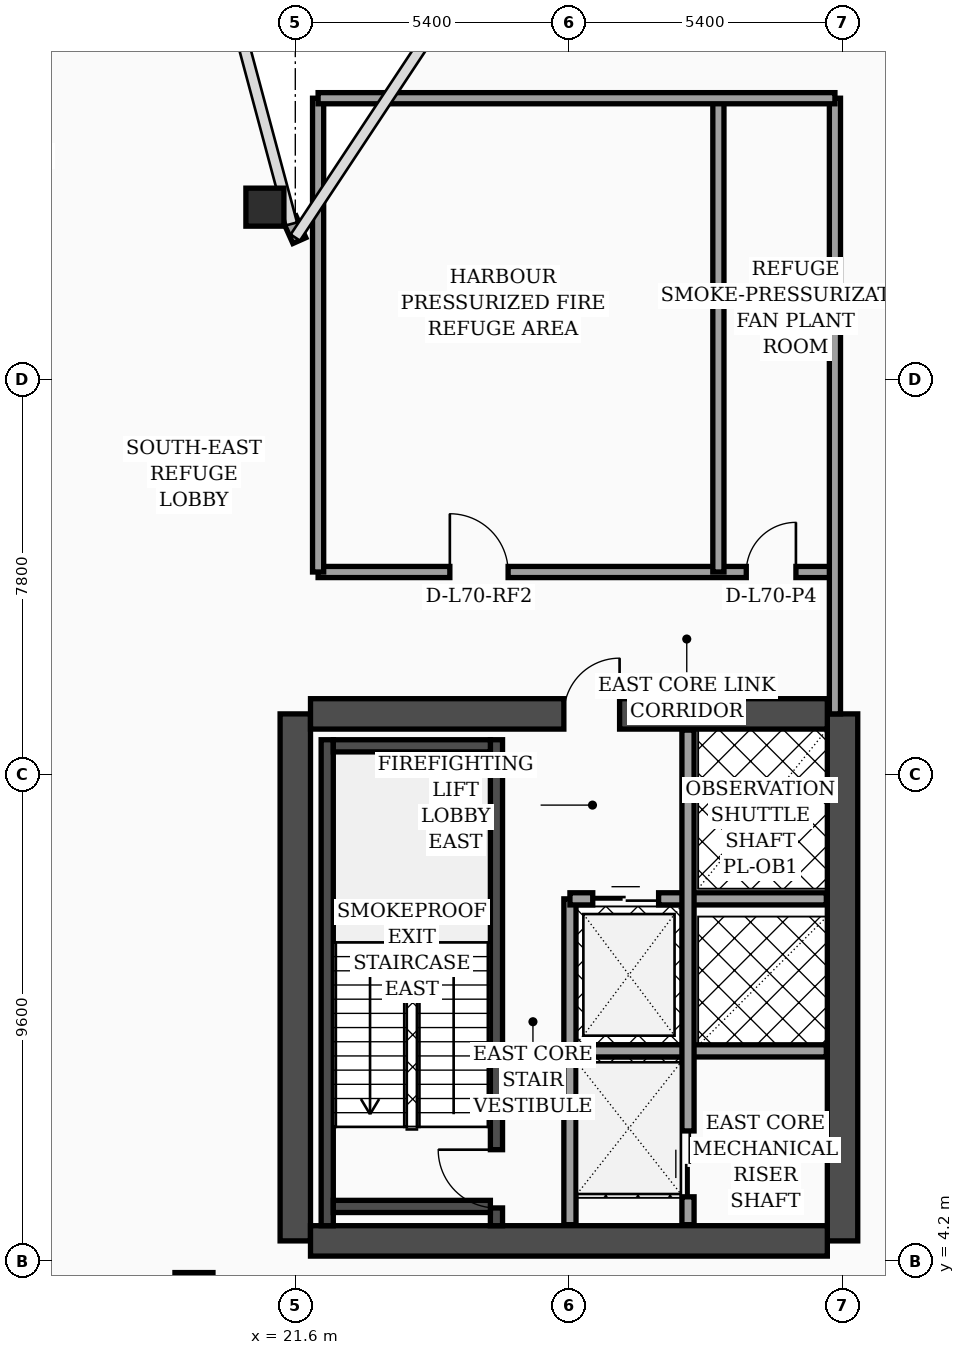
"""IFC4 building model, lengths in metres.
Left out: names, types, materials, properties, quantities, classifications, styles, units other than length and angle.
Written with IfcOpenShell. Run it as: python <this file> out.ifc"""

import sys

from ifc_helpers import new_model, si_unit, direction, frame, frame_2d, origin, origin_2d, place, context, subcontext, project, spatial, rectangle, hollow_rectangle, extrude, element, fill, save


model = new_model("IFC4")
c1 = context("Model", 3, precision=1e-05, world=origin(), true_north=direction((0.0, 1.0)))
c2 = subcontext(c1, "Body", "Model", "MODEL_VIEW")
j1 = project(units=[si_unit("LENGTHUNIT", "METRE"), si_unit("PLANEANGLEUNIT", "RADIAN")], contexts=[c1])
p1 = place(None, origin())
s1 = spatial("IfcSite", under=j1, at=p1, CompositionType="ELEMENT")
p2 = place(p1, origin())
s2 = spatial("IfcBuilding", under=s1, at=p2, CompositionType="ELEMENT")
p3 = place(p2, frame((0.0, 0.0, 282.5)))
s3 = spatial("IfcBuildingStorey", under=s2, at=p3, CompositionType="ELEMENT", Elevation=282.5)
for number, where, z_axis, x_axis in (
    (1, (21.6, 4.6, 0.0), (0.0, 0.0, 1.0), (0.0, 1.0, 0.0)),
    (2, (32.4, 4.6, 0.0), (0.0, 0.0, 1.0), (0.0, 1.0, 0.0)),
):
    element("IfcWall", number, at=place(p3, frame(where, z_axis=z_axis, x_axis=x_axis)), inside=s3, PredefinedType="SHEAR", context=c2, shape_type="SweptSolid", body=[
        extrude(rectangle(XDim=10.4, YDim=0.6, at=frame_2d((5.2, 0.0))), origin(), (0.0, 0.0, 1.0), 4.35),
    ])
p4 = place(p3, frame((21.9, 15.0, 0.0), z_axis=(0.0, 0.0, 1.0), x_axis=(1.0, 0.0, 0.0)))
e3 = element("IfcWall", 3, at=p4, inside=s3, PredefinedType="SHEAR", context=c2, shape_type="SweptSolid", body=[
    extrude(rectangle(XDim=10.2, YDim=0.6, at=frame_2d((5.1, 0.0))), origin(), (0.0, 0.0, 1.0), 4.35),
])
p5 = place(p4, frame((5.0, 0.0, 0.0)))
e4 = element("IfcOpeningElement", 4, at=p5, cuts=e3, PredefinedType="OPENING", context=c2, shape_type="SweptSolid", body=[
    extrude(rectangle(XDim=1.1, YDim=2.2, at=frame_2d((0.55, 1.1))), frame((0.0, 0.31, 0.0), z_axis=(0.0, -1.0, 0.0), x_axis=(1.0, 0.0, 0.0)), (0.0, 0.0, 1.0), 0.62),
])
p6 = place(p3, frame((21.9, 4.6, 0.0), z_axis=(0.0, 0.0, 1.0), x_axis=(1.0, 0.0, 0.0)))
e5 = element("IfcWall", 5, at=p6, inside=s3, PredefinedType="SHEAR", context=c2, shape_type="SweptSolid", body=[
    extrude(rectangle(XDim=10.2, YDim=0.6, at=frame_2d((5.1, 0.0))), origin(), (0.0, 0.0, 1.0), 4.35),
])
p7 = place(p3, frame((22.23, 4.9, 0.0), z_axis=(0.0, 0.0, 1.0), x_axis=(0.0, 1.0, 0.0)))
e6 = element("IfcWall", 6, at=p7, inside=s3, PredefinedType="SOLIDWALL", context=c2, shape_type="SweptSolid", body=[
    extrude(rectangle(XDim=9.59, YDim=0.24, at=frame_2d((4.795, 0.0))), origin(), (0.0, 0.0, 1.0), 4.35),
])
p8 = place(p3, frame((25.57, 4.9, 0.0), z_axis=(0.0, 0.0, 1.0), x_axis=(0.0, 1.0, 0.0)))
e7 = element("IfcWall", 7, at=p8, inside=s3, PredefinedType="SOLIDWALL", context=c2, shape_type="SweptSolid", body=[
    extrude(rectangle(XDim=9.59, YDim=0.24, at=frame_2d((4.795, 0.0))), origin(), (0.0, 0.0, 1.0), 4.35),
])
p9 = place(p8, frame((0.35, 0.0, 0.0)))
e8 = element("IfcOpeningElement", 8, at=p9, cuts=e7, PredefinedType="OPENING", context=c2, shape_type="SweptSolid", body=[
    extrude(rectangle(XDim=1.15, YDim=2.2, at=frame_2d((0.575, 1.1))), frame((0.0, 0.13, 0.0), z_axis=(0.0, -1.0, 0.0), x_axis=(1.0, 0.0, 0.0)), (0.0, 0.0, 1.0), 0.26),
])
for number, where, z_axis, x_axis in (
    (9, (22.35, 5.28, 0.0), (0.0, 0.0, 1.0), (1.0, 0.0, 0.0)),
    (10, (22.35, 14.37, 0.0), (0.0, 0.0, 1.0), (1.0, 0.0, 0.0)),
):
    element("IfcWall", number, at=place(p3, frame(where, z_axis=z_axis, x_axis=x_axis)), inside=s3, PredefinedType="SOLIDWALL", context=c2, shape_type="SweptSolid", body=[
        extrude(rectangle(XDim=3.1, YDim=0.24, at=frame_2d((1.55, 0.0))), origin(), (0.0, 0.0, 1.0), 4.35),
    ])
for number, where, z_axis, x_axis in (
    (11, (21.0, 25.0, 0.0), (0.0, 0.0, 1.0), (1.0, 0.0, 0.0)),
    (12, (19.6, 3.6, 0.0), (0.0, 0.0, 1.0), (1.0, 0.0, 0.0)),
):
    element("IfcColumn", number, at=place(p3, frame(where, z_axis=z_axis, x_axis=x_axis)), inside=s3, PredefinedType="COLUMN", context=c2, shape_type="SweptSolid", body=[
        extrude(hollow_rectangle(XDim=0.75, YDim=0.75, WallThickness=0.032, at=origin_2d()), origin(), (0.0, 0.0, 1.0), 4.35),
    ])
p10 = place(p3, frame((21.68, 24.34, 0.0), z_axis=(0.0, 0.0, 1.0), x_axis=(-0.40758134973, 0.913168901875, 0.0)))
e13 = element("IfcWall", 13, at=p10, inside=s3, PredefinedType="SOLIDWALL", context=c2, shape_type="SweptSolid", body=[
    extrude(rectangle(XDim=0.471, YDim=0.28, at=frame_2d((0.235, 0.0))), origin(), (0.0, 0.0, 1.0), 4.35),
])
p11 = place(p3, frame((27.02, 4.92, 0.0), z_axis=(0.0, 0.0, 1.0), x_axis=(0.0, 1.0, 0.0)))
e14 = element("IfcWall", 14, at=p11, inside=s3, PredefinedType="SOLIDWALL", context=c2, shape_type="SweptSolid", body=[
    extrude(rectangle(XDim=6.43, YDim=0.24, at=frame_2d((3.215, 0.0))), origin(), (0.0, 0.0, 1.0), 4.35),
])
p12 = place(p3, frame((27.02, 11.35, 0.0), z_axis=(0.0, 0.0, 1.0), x_axis=(1.0, 0.0, 0.0)))
e15 = element("IfcWall", 15, at=p12, inside=s3, PredefinedType="SOLIDWALL", context=c2, shape_type="SweptSolid", body=[
    extrude(rectangle(XDim=5.06, YDim=0.24, at=frame_2d((2.53, 0.0))), origin(), (0.0, 0.0, 1.0), 4.35),
])
p13 = place(p12, frame((0.45, 0.0, 0.0)))
e16 = element("IfcOpeningElement", 16, at=p13, cuts=e15, PredefinedType="OPENING", context=c2, shape_type="SweptSolid", body=[
    extrude(rectangle(XDim=1.3, YDim=2.35, at=frame_2d((0.65, 1.175))), frame((0.0, 0.13, 0.0), z_axis=(0.0, -1.0, 0.0), x_axis=(1.0, 0.0, 0.0)), (0.0, 0.0, 1.0), 0.26),
])
p14 = place(p3, frame((27.02, 8.35, 0.0), z_axis=(0.0, 0.0, 1.0), x_axis=(1.0, 0.0, 0.0)))
e17 = element("IfcWall", 17, at=p14, inside=s3, PredefinedType="SOLIDWALL", context=c2, shape_type="SweptSolid", body=[
    extrude(rectangle(XDim=5.06, YDim=0.24, at=frame_2d((2.53, 0.0))), origin(), (0.0, 0.0, 1.0), 4.35),
])
p15 = place(p3, frame((29.35, 4.92, 0.0), z_axis=(0.0, 0.0, 1.0), x_axis=(0.0, 1.0, 0.0)))
e18 = element("IfcWall", 18, at=p15, inside=s3, PredefinedType="SOLIDWALL", context=c2, shape_type="SweptSolid", body=[
    extrude(rectangle(XDim=9.76, YDim=0.24, at=frame_2d((4.88, 0.0))), origin(), (0.0, 0.0, 1.0), 4.35),
])
p16 = place(p15, frame((0.55, 0.0, 0.0)))
e19 = element("IfcOpeningElement", 19, at=p16, cuts=e18, PredefinedType="OPENING", context=c2, shape_type="SweptSolid", body=[
    extrude(rectangle(XDim=1.3, YDim=2.35, at=frame_2d((0.65, 1.175))), frame((0.0, 0.13, 0.0), z_axis=(0.0, -1.0, 0.0), x_axis=(1.0, 0.0, 0.0)), (0.0, 0.0, 1.0), 0.26),
])
p17 = place(p3, frame((22.05, 17.8, 0.0), z_axis=(0.0, 0.0, 1.0), x_axis=(1.0, 0.0, 0.0)))
e20 = element("IfcWall", 20, at=p17, inside=s3, PredefinedType="SOLIDWALL", context=c2, shape_type="SweptSolid", body=[
    extrude(rectangle(XDim=10.2, YDim=0.22, at=frame_2d((5.1, 0.0))), origin(), (0.0, 0.0, 1.0), 2.65),
])
p18 = place(p17, frame((2.6, 0.0, 0.0)))
e21 = element("IfcOpeningElement", 21, at=p18, cuts=e20, PredefinedType="OPENING", context=c2, shape_type="SweptSolid", body=[
    extrude(rectangle(XDim=1.15, YDim=2.2, at=frame_2d((0.575, 1.1))), frame((0.0, 0.12, 0.0), z_axis=(0.0, -1.0, 0.0), x_axis=(1.0, 0.0, 0.0)), (0.0, 0.0, 1.0), 0.24),
])
p19 = place(p17, frame((8.45, 0.0, 0.0)))
e22 = element("IfcOpeningElement", 22, at=p19, cuts=e20, PredefinedType="OPENING", context=c2, shape_type="SweptSolid", body=[
    extrude(rectangle(XDim=0.98, YDim=2.15, at=frame_2d((0.49, 1.075))), frame((0.0, 0.12, 0.0), z_axis=(0.0, -1.0, 0.0), x_axis=(1.0, 0.0, 0.0)), (0.0, 0.0, 1.0), 0.24),
])
p20 = place(p3, frame((29.95, 17.8, 0.0), z_axis=(0.0, 0.0, 1.0), x_axis=(0.0, 1.0, 0.0)))
e23 = element("IfcWall", 23, at=p20, inside=s3, PredefinedType="SOLIDWALL", context=c2, shape_type="SweptSolid", body=[
    extrude(rectangle(XDim=9.35, YDim=0.22, at=frame_2d((4.675, 0.0))), origin(), (0.0, 0.0, 1.0), 4.0),
])
p21 = place(p3, frame((22.05, 17.8, 0.0), z_axis=(0.0, 0.0, 1.0), x_axis=(0.0, 1.0, 0.0)))
e24 = element("IfcWall", 24, at=p21, inside=s3, PredefinedType="SOLIDWALL", context=c2, shape_type="SweptSolid", body=[
    extrude(rectangle(XDim=9.35, YDim=0.22, at=frame_2d((4.675, 0.0))), origin(), (0.0, 0.0, 1.0), 2.65),
])
p22 = place(p3, frame((32.25, 15.0, 0.0), z_axis=(0.0, 0.0, 1.0), x_axis=(0.0, 1.0, 0.0)))
e25 = element("IfcWall", 25, at=p22, inside=s3, PredefinedType="SOLIDWALL", context=c2, shape_type="SweptSolid", body=[
    extrude(rectangle(XDim=12.15, YDim=0.22, at=frame_2d((6.075, 0.0))), origin(), (0.0, 0.0, 1.0), 2.65),
])
p23 = place(p3, frame((22.05, 27.15, 0.0), z_axis=(0.0, 0.0, 1.0), x_axis=(1.0, 0.0, 0.0)))
e26 = element("IfcWall", 26, at=p23, inside=s3, PredefinedType="SOLIDWALL", context=c2, shape_type="SweptSolid", body=[
    extrude(rectangle(XDim=10.2, YDim=0.22, at=frame_2d((5.1, 0.0))), origin(), (0.0, 0.0, 1.0), 2.65),
])
p24 = place(p13, origin())
e27 = element("IfcDoor", 27, at=p24, inside=s3, OperationType="DOUBLE_DOOR_SLIDING", PredefinedType="DOOR", context=c2, shape_type="SweptSolid", body=[
    extrude(rectangle(XDim=1.3, YDim=2.35, at=frame_2d((0.65, 1.175))), frame((0.0, 0.025, 0.0), z_axis=(0.0, -1.0, 0.0), x_axis=(1.0, 0.0, 0.0)), (0.0, 0.0, 1.0), 0.05),
])
fill(e16, e27)
p25 = place(p16, origin())
e28 = element("IfcDoor", 28, at=p25, inside=s3, OperationType="DOUBLE_DOOR_SLIDING", PredefinedType="DOOR", context=c2, shape_type="SweptSolid", body=[
    extrude(rectangle(XDim=1.3, YDim=2.35, at=frame_2d((0.65, 1.175))), frame((0.0, 0.025, 0.0), z_axis=(0.0, -1.0, 0.0), x_axis=(1.0, 0.0, 0.0)), (0.0, 0.0, 1.0), 0.05),
])
fill(e19, e28)
p26 = place(p18, origin())
e29 = element("IfcDoor", 29, at=p26, inside=s3, OperationType="SINGLE_SWING_LEFT", PredefinedType="DOOR", context=c2, shape_type="SweptSolid", body=[
    extrude(rectangle(XDim=1.15, YDim=2.2, at=frame_2d((0.575, 1.1))), frame((0.0, 0.025, 0.0), z_axis=(0.0, -1.0, 0.0), x_axis=(1.0, 0.0, 0.0)), (0.0, 0.0, 1.0), 0.05),
])
fill(e21, e29)
p27 = place(p19, origin())
e30 = element("IfcDoor", 30, at=p27, inside=s3, OperationType="SINGLE_SWING_RIGHT", PredefinedType="DOOR", context=c2, shape_type="SweptSolid", body=[
    extrude(rectangle(XDim=0.98, YDim=2.15, at=frame_2d((0.49, 1.075))), frame((0.0, 0.025, 0.0), z_axis=(0.0, -1.0, 0.0), x_axis=(1.0, 0.0, 0.0)), (0.0, 0.0, 1.0), 0.05),
])
fill(e22, e30)
p28 = place(p9, origin())
e31 = element("IfcDoor", 31, at=p28, inside=s3, OperationType="SINGLE_SWING_RIGHT", PredefinedType="DOOR", context=c2, shape_type="SweptSolid", body=[
    extrude(rectangle(XDim=1.15, YDim=2.2, at=frame_2d((0.575, 1.1))), frame((0.0, 0.025, 0.0), z_axis=(0.0, -1.0, 0.0), x_axis=(1.0, 0.0, 0.0)), (0.0, 0.0, 1.0), 0.05),
])
fill(e8, e31)
p29 = place(p5, origin())
e32 = element("IfcDoor", 32, at=p29, inside=s3, OperationType="SINGLE_SWING_RIGHT", PredefinedType="DOOR", context=c2, shape_type="SweptSolid", body=[
    extrude(rectangle(XDim=1.1, YDim=2.2, at=frame_2d((0.55, 1.1))), frame((0.0, 0.025, 0.0), z_axis=(0.0, -1.0, 0.0), x_axis=(1.0, 0.0, 0.0)), (0.0, 0.0, 1.0), 0.05),
])
fill(e4, e32)
save(model, sys.argv[1])
